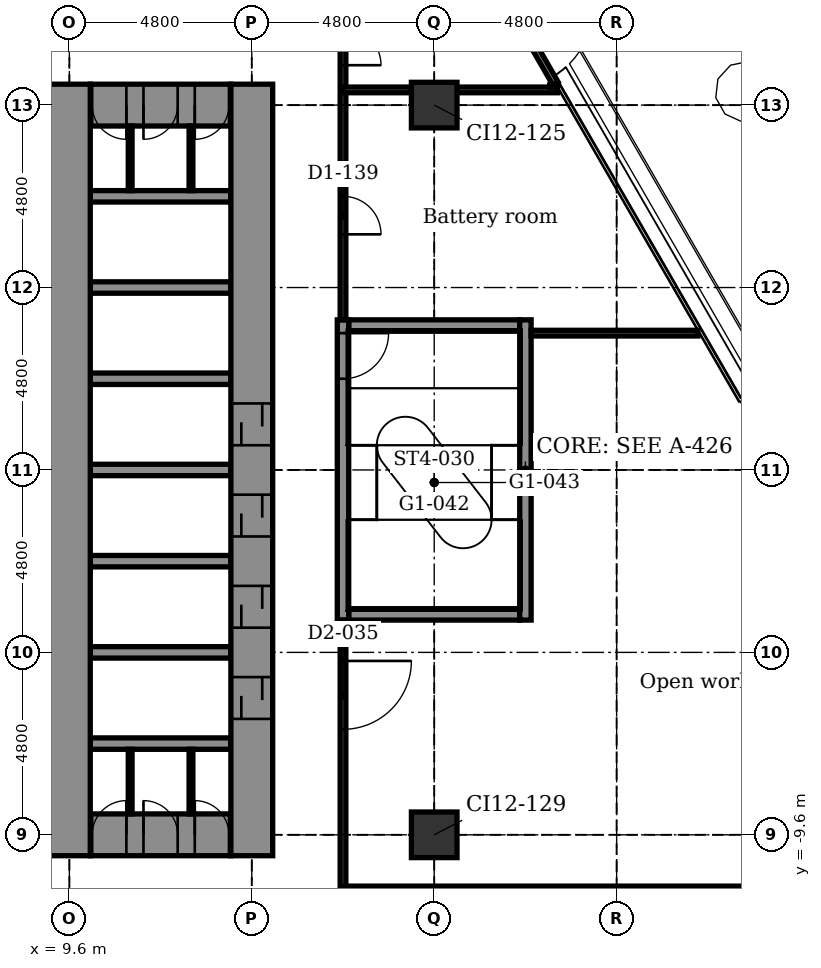
"""IFC4 building model, lengths in metres.
Left out: names, types, materials, properties, quantities, classifications, styles, units other than length and angle.
Written with IfcOpenShell. Run it as: python <this file> out.ifc"""

import sys

from ifc_helpers import new_model, si_unit, direction, frame, frame_2d, origin, origin_2d, place, context, subcontext, project, spatial, rectangle, extrude, element, fill, save


model = new_model("IFC4")
c1 = context("Model", 3, precision=1e-05, world=origin(), true_north=direction((0.0, 1.0)))
c2 = subcontext(c1, "Body", "Model", "MODEL_VIEW")
j1 = project(units=[si_unit("LENGTHUNIT", "METRE"), si_unit("PLANEANGLEUNIT", "RADIAN")], contexts=[c1])
p1 = place(None, origin())
s1 = spatial("IfcSite", under=j1, at=p1, CompositionType="ELEMENT")
p2 = place(p1, origin())
s2 = spatial("IfcBuilding", under=s1, at=p2, CompositionType="ELEMENT")
p3 = place(p2, frame((0.0, 0.0, 60.9)))
s3 = spatial("IfcBuildingStorey", under=s2, at=p3, CompositionType="ELEMENT", Elevation=60.9)
for number, where, z_axis, x_axis in (
    (1, (19.2, -9.6, -0.25), (0.0, 0.0, 1.0), (1.0, 0.0, 0.0)),
    (2, (19.2, 9.6, -0.25), (0.0, 0.0, 1.0), (1.0, 0.0, 0.0)),
):
    element("IfcColumn", number, at=place(p3, frame(where, z_axis=z_axis, x_axis=x_axis)), inside=s3, PredefinedType="COLUMN", context=c2, shape_type="SweptSolid", body=[
        extrude(rectangle(XDim=1.2, YDim=1.2, at=origin_2d()), origin(), (0.0, 0.0, 1.0), 5.45),
    ])
p4 = place(p3, frame((10.15, -9.6, -0.25), z_axis=(0.0, 0.0, 1.0), x_axis=(1.0, 0.0, 0.0)))
e3 = element("IfcWall", 3, at=p4, inside=s3, PredefinedType="SHEAR", context=c2, shape_type="SweptSolid", body=[
    extrude(rectangle(XDim=3.7, YDim=1.1, at=frame_2d((1.85, 0.0))), origin(), (0.0, 0.0, 1.0), 5.45),
])
p5 = place(p4, frame((0.05, 0.0, 0.25)))
e4 = element("IfcOpeningElement", 4, at=p5, cuts=e3, PredefinedType="OPENING", context=c2, shape_type="SweptSolid", body=[
    extrude(rectangle(XDim=0.9, YDim=2.1, at=frame_2d((0.45, 1.05))), frame((0.0, 0.56, 0.0), z_axis=(0.0, -1.0, 0.0), x_axis=(1.0, 0.0, 0.0)), (0.0, 0.0, 1.0), 1.12),
])
p6 = place(p4, frame((1.4, 0.0, 0.25)))
e5 = element("IfcOpeningElement", 5, at=p6, cuts=e3, PredefinedType="OPENING", context=c2, shape_type="SweptSolid", body=[
    extrude(rectangle(XDim=0.9, YDim=2.1, at=frame_2d((0.45, 1.05))), frame((0.0, 0.56, 0.0), z_axis=(0.0, -1.0, 0.0), x_axis=(1.0, 0.0, 0.0)), (0.0, 0.0, 1.0), 1.12),
])
p7 = place(p4, frame((2.75, 0.0, 0.25)))
e6 = element("IfcOpeningElement", 6, at=p7, cuts=e3, PredefinedType="OPENING", context=c2, shape_type="SweptSolid", body=[
    extrude(rectangle(XDim=0.9, YDim=2.1, at=frame_2d((0.45, 1.05))), frame((0.0, 0.56, 0.0), z_axis=(0.0, -1.0, 0.0), x_axis=(1.0, 0.0, 0.0)), (0.0, 0.0, 1.0), 1.12),
])
for number, where, z_axis, x_axis in (
    (7, (10.15, -7.2, -0.25), (0.0, 0.0, 1.0), (1.0, 0.0, 0.0)),
    (8, (10.15, -4.8, -0.25), (0.0, 0.0, 1.0), (1.0, 0.0, 0.0)),
):
    element("IfcWall", number, at=place(p3, frame(where, z_axis=z_axis, x_axis=x_axis)), inside=s3, PredefinedType="STANDARD", context=c2, shape_type="SweptSolid", body=[
        extrude(rectangle(XDim=3.7, YDim=0.3, at=frame_2d((1.85, 0.0))), origin(), (0.0, 0.0, 1.0), 5.45),
    ])
p8 = place(p3, frame((16.95, -3.8, -0.25), z_axis=(0.0, 0.0, 1.0), x_axis=(1.0, 0.0, 0.0)))
e9 = element("IfcWall", 9, at=p8, inside=s3, PredefinedType="STANDARD", context=c2, shape_type="SweptSolid", body=[
    extrude(rectangle(XDim=4.5, YDim=0.3, at=frame_2d((2.25, 0.0))), origin(), (0.0, 0.0, 1.0), 5.45),
])
for number, where, z_axis, x_axis in (
    (10, (10.15, -2.4, -0.25), (0.0, 0.0, 1.0), (1.0, 0.0, 0.0)),
    (11, (10.15, 0.0, -0.25), (0.0, 0.0, 1.0), (1.0, 0.0, 0.0)),
    (12, (10.15, 2.4, -0.25), (0.0, 0.0, 1.0), (1.0, 0.0, 0.0)),
):
    element("IfcWall", number, at=place(p3, frame(where, z_axis=z_axis, x_axis=x_axis)), inside=s3, PredefinedType="STANDARD", context=c2, shape_type="SweptSolid", body=[
        extrude(rectangle(XDim=3.7, YDim=0.3, at=frame_2d((1.85, 0.0))), origin(), (0.0, 0.0, 1.0), 5.45),
    ])
p9 = place(p3, frame((16.95, 3.8, -0.25), z_axis=(0.0, 0.0, 1.0), x_axis=(1.0, 0.0, 0.0)))
e13 = element("IfcWall", 13, at=p9, inside=s3, PredefinedType="STANDARD", context=c2, shape_type="SweptSolid", body=[
    extrude(rectangle(XDim=4.5, YDim=0.3, at=frame_2d((2.25, 0.0))), origin(), (0.0, 0.0, 1.0), 5.45),
])
for number, where, z_axis, x_axis in (
    (14, (10.15, 4.8, -0.25), (0.0, 0.0, 1.0), (1.0, 0.0, 0.0)),
    (15, (10.15, 7.2, -0.25), (0.0, 0.0, 1.0), (1.0, 0.0, 0.0)),
):
    element("IfcWall", number, at=place(p3, frame(where, z_axis=z_axis, x_axis=x_axis)), inside=s3, PredefinedType="STANDARD", context=c2, shape_type="SweptSolid", body=[
        extrude(rectangle(XDim=3.7, YDim=0.3, at=frame_2d((1.85, 0.0))), origin(), (0.0, 0.0, 1.0), 5.45),
    ])
p10 = place(p3, frame((10.15, 9.6, -0.25), z_axis=(0.0, 0.0, 1.0), x_axis=(1.0, 0.0, 0.0)))
e16 = element("IfcWall", 16, at=p10, inside=s3, PredefinedType="SHEAR", context=c2, shape_type="SweptSolid", body=[
    extrude(rectangle(XDim=3.7, YDim=1.1, at=frame_2d((1.85, 0.0))), origin(), (0.0, 0.0, 1.0), 5.45),
])
p11 = place(p10, frame((0.05, 0.0, 0.25)))
e17 = element("IfcOpeningElement", 17, at=p11, cuts=e16, PredefinedType="OPENING", context=c2, shape_type="SweptSolid", body=[
    extrude(rectangle(XDim=0.9, YDim=2.1, at=frame_2d((0.45, 1.05))), frame((0.0, 0.56, 0.0), z_axis=(0.0, -1.0, 0.0), x_axis=(1.0, 0.0, 0.0)), (0.0, 0.0, 1.0), 1.12),
])
p12 = place(p10, frame((1.4, 0.0, 0.25)))
e18 = element("IfcOpeningElement", 18, at=p12, cuts=e16, PredefinedType="OPENING", context=c2, shape_type="SweptSolid", body=[
    extrude(rectangle(XDim=0.9, YDim=2.1, at=frame_2d((0.45, 1.05))), frame((0.0, 0.56, 0.0), z_axis=(0.0, -1.0, 0.0), x_axis=(1.0, 0.0, 0.0)), (0.0, 0.0, 1.0), 1.12),
])
p13 = place(p10, frame((2.75, 0.0, 0.25)))
e19 = element("IfcOpeningElement", 19, at=p13, cuts=e16, PredefinedType="OPENING", context=c2, shape_type="SweptSolid", body=[
    extrude(rectangle(XDim=0.9, YDim=2.1, at=frame_2d((0.45, 1.05))), frame((0.0, 0.56, 0.0), z_axis=(0.0, -1.0, 0.0), x_axis=(1.0, 0.0, 0.0)), (0.0, 0.0, 1.0), 1.12),
])
p14 = place(p3, frame((9.6, -10.15, -0.25), z_axis=(0.0, 0.0, 1.0), x_axis=(0.0, 1.0, 0.0)))
e20 = element("IfcWall", 20, at=p14, inside=s3, PredefinedType="SHEAR", context=c2, shape_type="SweptSolid", body=[
    extrude(rectangle(XDim=20.3, YDim=1.1, at=frame_2d((10.15, 0.0))), origin(), (0.0, 0.0, 1.0), 5.45),
])
p15 = place(p3, frame((14.4, -10.15, -0.25), z_axis=(0.0, 0.0, 1.0), x_axis=(0.0, 1.0, 0.0)))
e21 = element("IfcWall", 21, at=p15, inside=s3, PredefinedType="SHEAR", context=c2, shape_type="SweptSolid", body=[
    extrude(rectangle(XDim=20.3, YDim=1.1, at=frame_2d((10.15, 0.0))), origin(), (0.0, 0.0, 1.0), 5.45),
])
p16 = place(p15, frame((3.6, 0.0, 0.25)))
e22 = element("IfcOpeningElement", 22, at=p16, cuts=e21, PredefinedType="OPENING", context=c2, shape_type="SweptSolid", body=[
    extrude(rectangle(XDim=1.1, YDim=2.1, at=frame_2d((0.55, 1.05))), frame((0.0, 0.56, 0.0), z_axis=(0.0, -1.0, 0.0), x_axis=(1.0, 0.0, 0.0)), (0.0, 0.0, 1.0), 1.12),
])
p17 = place(p15, frame((6.0, 0.0, 0.25)))
e23 = element("IfcOpeningElement", 23, at=p17, cuts=e21, PredefinedType="OPENING", context=c2, shape_type="SweptSolid", body=[
    extrude(rectangle(XDim=1.1, YDim=2.1, at=frame_2d((0.55, 1.05))), frame((0.0, 0.56, 0.0), z_axis=(0.0, -1.0, 0.0), x_axis=(1.0, 0.0, 0.0)), (0.0, 0.0, 1.0), 1.12),
])
p18 = place(p15, frame((8.4, 0.0, 0.25)))
e24 = element("IfcOpeningElement", 24, at=p18, cuts=e21, PredefinedType="OPENING", context=c2, shape_type="SweptSolid", body=[
    extrude(rectangle(XDim=1.1, YDim=2.1, at=frame_2d((0.55, 1.05))), frame((0.0, 0.56, 0.0), z_axis=(0.0, -1.0, 0.0), x_axis=(1.0, 0.0, 0.0)), (0.0, 0.0, 1.0), 1.12),
])
p19 = place(p15, frame((10.8, 0.0, 0.25)))
e25 = element("IfcOpeningElement", 25, at=p19, cuts=e21, PredefinedType="OPENING", context=c2, shape_type="SweptSolid", body=[
    extrude(rectangle(XDim=1.1, YDim=2.1, at=frame_2d((0.55, 1.05))), frame((0.0, 0.56, 0.0), z_axis=(0.0, -1.0, 0.0), x_axis=(1.0, 0.0, 0.0)), (0.0, 0.0, 1.0), 1.12),
])
p20 = place(p3, frame((16.8, -3.95, -0.25), z_axis=(0.0, 0.0, 1.0), x_axis=(0.0, 1.0, 0.0)))
e26 = element("IfcWall", 26, at=p20, inside=s3, PredefinedType="STANDARD", context=c2, shape_type="SweptSolid", body=[
    extrude(rectangle(XDim=7.9, YDim=0.3, at=frame_2d((3.95, 0.0))), origin(), (0.0, 0.0, 1.0), 5.45),
])
p21 = place(p20, frame((6.35, 0.0, 0.25)))
e27 = element("IfcOpeningElement", 27, at=p21, cuts=e26, PredefinedType="OPENING", context=c2, shape_type="SweptSolid", body=[
    extrude(rectangle(XDim=1.2, YDim=2.1, at=frame_2d((0.6, 1.05))), frame((0.0, 0.16, 0.0), z_axis=(0.0, -1.0, 0.0), x_axis=(1.0, 0.0, 0.0)), (0.0, 0.0, 1.0), 0.32),
])
p22 = place(p3, frame((21.6, -3.95, -0.25), z_axis=(0.0, 0.0, 1.0), x_axis=(0.0, 1.0, 0.0)))
e28 = element("IfcWall", 28, at=p22, inside=s3, PredefinedType="STANDARD", context=c2, shape_type="SweptSolid", body=[
    extrude(rectangle(XDim=7.9, YDim=0.3, at=frame_2d((3.95, 0.0))), origin(), (0.0, 0.0, 1.0), 5.45),
])
p23 = place(p3, frame((20.003, 14.304, 0.0), z_axis=(0.0, 0.0, 1.0), x_axis=(0.500007367075, -0.86602115036, 0.0)))
e29 = element("IfcWall", 29, at=p23, inside=s3, PredefinedType="PARTITIONING", context=c2, shape_type="SweptSolid", body=[
    extrude(rectangle(XDim=4.772, YDim=0.16, at=frame_2d((2.386, 0.0))), origin(), (0.0, 0.0, 1.0), 5.2),
])
p24 = place(p23, frame((1.186, 0.0, 0.0)))
e30 = element("IfcOpeningElement", 30, at=p24, cuts=e29, PredefinedType="OPENING", context=c2, shape_type="SweptSolid", body=[
    extrude(rectangle(XDim=2.4, YDim=2.4, at=frame_2d((1.2, 1.2))), frame((0.0, 0.09, 0.0), z_axis=(0.0, -1.0, 0.0), x_axis=(1.0, 0.0, 0.0)), (0.0, 0.0, 1.0), 0.18),
])
p25 = place(p3, frame((16.8, -12.4, 0.0), z_axis=(0.0, 0.0, 1.0), x_axis=(0.0, 1.0, 0.0)))
e31 = element("IfcWall", 31, at=p25, inside=s3, PredefinedType="PARTITIONING", context=c2, shape_type="SweptSolid", body=[
    extrude(rectangle(XDim=8.45, YDim=0.15, at=frame_2d((4.225, 0.0))), origin(), (0.0, 0.0, 1.0), 5.2),
])
p26 = place(p25, frame((5.575, 0.0, 0.0)))
e32 = element("IfcOpeningElement", 32, at=p26, cuts=e31, PredefinedType="OPENING", context=c2, shape_type="SweptSolid", body=[
    extrude(rectangle(XDim=1.8, YDim=2.1, at=frame_2d((0.9, 1.05))), frame((0.0, 0.085, 0.0), z_axis=(0.0, -1.0, 0.0), x_axis=(1.0, 0.0, 0.0)), (0.0, 0.0, 1.0), 0.17),
])
p27 = place(p3, frame((16.8, 3.95, 0.0), z_axis=(0.0, 0.0, 1.0), x_axis=(0.0, 1.0, 0.0)))
e33 = element("IfcWall", 33, at=p27, inside=s3, PredefinedType="PARTITIONING", context=c2, shape_type="SweptSolid", body=[
    extrude(rectangle(XDim=8.75, YDim=0.15, at=frame_2d((4.375, 0.0))), origin(), (0.0, 0.0, 1.0), 5.2),
])
p28 = place(p27, frame((2.25, 0.0, 0.0)))
e34 = element("IfcOpeningElement", 34, at=p28, cuts=e33, PredefinedType="OPENING", context=c2, shape_type="SweptSolid", body=[
    extrude(rectangle(XDim=1.0, YDim=2.1, at=frame_2d((0.5, 1.05))), frame((0.0, 0.085, 0.0), z_axis=(0.0, -1.0, 0.0), x_axis=(1.0, 0.0, 0.0)), (0.0, 0.0, 1.0), 0.17),
])
p29 = place(p27, frame((6.7, 0.0, 0.0)))
e35 = element("IfcOpeningElement", 35, at=p29, cuts=e33, PredefinedType="OPENING", context=c2, shape_type="SweptSolid", body=[
    extrude(rectangle(XDim=1.0, YDim=2.1, at=frame_2d((0.5, 1.05))), frame((0.0, 0.085, 0.0), z_axis=(0.0, -1.0, 0.0), x_axis=(1.0, 0.0, 0.0)), (0.0, 0.0, 1.0), 0.17),
])
for number, where, z_axis, x_axis in (
    (36, (12.8, -9.05, 0.0), (0.0, 0.0, 1.0), (0.0, 1.0, 0.0)),
    (37, (12.8, 7.35, 0.0), (0.0, 0.0, 1.0), (0.0, 1.0, 0.0)),
    (38, (11.2, -9.05, 0.0), (0.0, 0.0, 1.0), (0.0, 1.0, 0.0)),
    (39, (11.2, 7.35, 0.0), (0.0, 0.0, 1.0), (0.0, 1.0, 0.0)),
):
    element("IfcWall", number, at=place(p3, frame(where, z_axis=z_axis, x_axis=x_axis)), inside=s3, PredefinedType="PARTITIONING", context=c2, shape_type="SweptSolid", body=[
        extrude(rectangle(XDim=1.7, YDim=0.1, at=frame_2d((0.85, 0.0))), origin(), (0.0, 0.0, 1.0), 5.2),
    ])
p30 = place(p3, frame((16.8, -11.0, 0.0), z_axis=(0.0, 0.0, 1.0), x_axis=(1.0, 0.0, 0.0)))
e40 = element("IfcWall", 40, at=p30, inside=s3, PredefinedType="PARTITIONING", context=c2, shape_type="SweptSolid", body=[
    extrude(rectangle(XDim=13.378, YDim=0.1, at=frame_2d((6.689, 0.0))), origin(), (0.0, 0.0, 1.0), 5.2),
])
p31 = place(p3, frame((21.75, 3.6, 0.0), z_axis=(0.0, 0.0, 1.0), x_axis=(1.0, 0.0, 0.0)))
e41 = element("IfcWall", 41, at=p31, inside=s3, PredefinedType="PARTITIONING", context=c2, shape_type="SweptSolid", body=[
    extrude(rectangle(XDim=4.387, YDim=0.15, at=frame_2d((2.194, 0.0))), origin(), (0.0, 0.0, 1.0), 5.2),
])
p32 = place(p3, frame((16.8, 10.0, 0.0), z_axis=(0.0, 0.0, 1.0), x_axis=(1.0, 0.0, 0.0)))
e42 = element("IfcWall", 42, at=p32, inside=s3, PredefinedType="PARTITIONING", context=c2, shape_type="SweptSolid", body=[
    extrude(rectangle(XDim=1.8, YDim=0.15, at=frame_2d((0.9, 0.0))), origin(), (0.0, 0.0, 1.0), 5.2),
])
p33 = place(p3, frame((19.8, 10.0, 0.0), z_axis=(0.0, 0.0, 1.0), x_axis=(1.0, 0.0, 0.0)))
e43 = element("IfcWall", 43, at=p33, inside=s3, PredefinedType="PARTITIONING", context=c2, shape_type="SweptSolid", body=[
    extrude(rectangle(XDim=2.642, YDim=0.15, at=frame_2d((1.321, 0.0))), origin(), (0.0, 0.0, 1.0), 5.2),
])
p34 = place(p3, frame((22.32, 10.132, 0.0), z_axis=(0.0, 0.0, 1.0), x_axis=(0.0, -1.0, 0.0)))
e44 = element("IfcWall", 44, at=p34, inside=s3, PredefinedType="PARTITIONING", context=c2, shape_type="SweptSolid", body=[
    extrude(rectangle(XDim=0.058, YDim=0.16, at=frame_2d((0.029, 0.0))), origin(), (0.0, 0.0, 1.0), 5.2),
])
p35 = place(p26, frame((1.8, 0.0, 0.0), z_axis=(0.0, 0.0, 1.0), x_axis=(-1.0, 0.0, 0.0)))
e45 = element("IfcDoor", 45, at=p35, inside=s3, OperationType="SINGLE_SWING_RIGHT", PredefinedType="DOOR", context=c2, shape_type="SweptSolid", body=[
    extrude(rectangle(XDim=1.8, YDim=2.1, at=frame_2d((0.9, 1.05))), frame((0.0, 0.025, 0.0), z_axis=(0.0, -1.0, 0.0), x_axis=(1.0, 0.0, 0.0)), (0.0, 0.0, 1.0), 0.05),
])
fill(e32, e45)
p36 = place(p28, frame((1.0, 0.0, 0.0), z_axis=(0.0, 0.0, 1.0), x_axis=(-1.0, 0.0, 0.0)))
e46 = element("IfcDoor", 46, at=p36, inside=s3, OperationType="SINGLE_SWING_LEFT", PredefinedType="DOOR", context=c2, shape_type="SweptSolid", body=[
    extrude(rectangle(XDim=1.0, YDim=2.1, at=frame_2d((0.5, 1.05))), frame((0.0, 0.025, 0.0), z_axis=(0.0, -1.0, 0.0), x_axis=(1.0, 0.0, 0.0)), (0.0, 0.0, 1.0), 0.05),
])
fill(e34, e46)
p37 = place(p29, frame((1.0, 0.0, 0.0), z_axis=(0.0, 0.0, 1.0), x_axis=(-1.0, 0.0, 0.0)))
e47 = element("IfcDoor", 47, at=p37, inside=s3, OperationType="SINGLE_SWING_LEFT", PredefinedType="DOOR", context=c2, shape_type="SweptSolid", body=[
    extrude(rectangle(XDim=1.0, YDim=2.1, at=frame_2d((0.5, 1.05))), frame((0.0, 0.025, 0.0), z_axis=(0.0, -1.0, 0.0), x_axis=(1.0, 0.0, 0.0)), (0.0, 0.0, 1.0), 0.05),
])
fill(e35, e47)
p38 = place(p16, origin())
e48 = element("IfcDoor", 48, at=p38, inside=s3, OperationType="DOUBLE_DOOR_SLIDING", PredefinedType="DOOR", context=c2, shape_type="SweptSolid", body=[
    extrude(rectangle(XDim=1.1, YDim=2.1, at=frame_2d((0.55, 1.05))), frame((0.0, 0.025, 0.0), z_axis=(0.0, -1.0, 0.0), x_axis=(1.0, 0.0, 0.0)), (0.0, 0.0, 1.0), 0.05),
])
fill(e22, e48)
p39 = place(p17, origin())
e49 = element("IfcDoor", 49, at=p39, inside=s3, OperationType="DOUBLE_DOOR_SLIDING", PredefinedType="DOOR", context=c2, shape_type="SweptSolid", body=[
    extrude(rectangle(XDim=1.1, YDim=2.1, at=frame_2d((0.55, 1.05))), frame((0.0, 0.025, 0.0), z_axis=(0.0, -1.0, 0.0), x_axis=(1.0, 0.0, 0.0)), (0.0, 0.0, 1.0), 0.05),
])
fill(e23, e49)
p40 = place(p18, origin())
e50 = element("IfcDoor", 50, at=p40, inside=s3, OperationType="DOUBLE_DOOR_SLIDING", PredefinedType="DOOR", context=c2, shape_type="SweptSolid", body=[
    extrude(rectangle(XDim=1.1, YDim=2.1, at=frame_2d((0.55, 1.05))), frame((0.0, 0.025, 0.0), z_axis=(0.0, -1.0, 0.0), x_axis=(1.0, 0.0, 0.0)), (0.0, 0.0, 1.0), 0.05),
])
fill(e24, e50)
p41 = place(p19, origin())
e51 = element("IfcDoor", 51, at=p41, inside=s3, OperationType="DOUBLE_DOOR_SLIDING", PredefinedType="DOOR", context=c2, shape_type="SweptSolid", body=[
    extrude(rectangle(XDim=1.1, YDim=2.1, at=frame_2d((0.55, 1.05))), frame((0.0, 0.025, 0.0), z_axis=(0.0, -1.0, 0.0), x_axis=(1.0, 0.0, 0.0)), (0.0, 0.0, 1.0), 0.05),
])
fill(e25, e51)
p42 = place(p21, frame((1.2, 0.0, 0.0), z_axis=(0.0, 0.0, 1.0), x_axis=(-1.0, 0.0, 0.0)))
e52 = element("IfcDoor", 52, at=p42, inside=s3, OperationType="SINGLE_SWING_RIGHT", PredefinedType="DOOR", context=c2, shape_type="SweptSolid", body=[
    extrude(rectangle(XDim=1.2, YDim=2.1, at=frame_2d((0.6, 1.05))), frame((0.0, 0.025, 0.0), z_axis=(0.0, -1.0, 0.0), x_axis=(1.0, 0.0, 0.0)), (0.0, 0.0, 1.0), 0.05),
])
fill(e27, e52)
p43 = place(p5, origin())
e53 = element("IfcDoor", 53, at=p43, inside=s3, OperationType="SINGLE_SWING_RIGHT", PredefinedType="DOOR", context=c2, shape_type="SweptSolid", body=[
    extrude(rectangle(XDim=0.9, YDim=2.1, at=frame_2d((0.45, 1.05))), frame((0.0, 0.025, 0.0), z_axis=(0.0, -1.0, 0.0), x_axis=(1.0, 0.0, 0.0)), (0.0, 0.0, 1.0), 0.05),
])
fill(e4, e53)
p44 = place(p6, origin())
e54 = element("IfcDoor", 54, at=p44, inside=s3, OperationType="SINGLE_SWING_LEFT", PredefinedType="DOOR", context=c2, shape_type="SweptSolid", body=[
    extrude(rectangle(XDim=0.9, YDim=2.1, at=frame_2d((0.45, 1.05))), frame((0.0, 0.025, 0.0), z_axis=(0.0, -1.0, 0.0), x_axis=(1.0, 0.0, 0.0)), (0.0, 0.0, 1.0), 0.05),
])
fill(e5, e54)
p45 = place(p7, origin())
e55 = element("IfcDoor", 55, at=p45, inside=s3, OperationType="SINGLE_SWING_LEFT", PredefinedType="DOOR", context=c2, shape_type="SweptSolid", body=[
    extrude(rectangle(XDim=0.9, YDim=2.1, at=frame_2d((0.45, 1.05))), frame((0.0, 0.025, 0.0), z_axis=(0.0, -1.0, 0.0), x_axis=(1.0, 0.0, 0.0)), (0.0, 0.0, 1.0), 0.05),
])
fill(e6, e55)
p46 = place(p11, frame((0.9, 0.0, 0.0), z_axis=(0.0, 0.0, 1.0), x_axis=(-1.0, 0.0, 0.0)))
e56 = element("IfcDoor", 56, at=p46, inside=s3, OperationType="SINGLE_SWING_RIGHT", PredefinedType="DOOR", context=c2, shape_type="SweptSolid", body=[
    extrude(rectangle(XDim=0.9, YDim=2.1, at=frame_2d((0.45, 1.05))), frame((0.0, 0.025, 0.0), z_axis=(0.0, -1.0, 0.0), x_axis=(1.0, 0.0, 0.0)), (0.0, 0.0, 1.0), 0.05),
])
fill(e17, e56)
p47 = place(p12, frame((0.9, 0.0, 0.0), z_axis=(0.0, 0.0, 1.0), x_axis=(-1.0, 0.0, 0.0)))
e57 = element("IfcDoor", 57, at=p47, inside=s3, OperationType="SINGLE_SWING_LEFT", PredefinedType="DOOR", context=c2, shape_type="SweptSolid", body=[
    extrude(rectangle(XDim=0.9, YDim=2.1, at=frame_2d((0.45, 1.05))), frame((0.0, 0.025, 0.0), z_axis=(0.0, -1.0, 0.0), x_axis=(1.0, 0.0, 0.0)), (0.0, 0.0, 1.0), 0.05),
])
fill(e18, e57)
p48 = place(p13, frame((0.9, 0.0, 0.0), z_axis=(0.0, 0.0, 1.0), x_axis=(-1.0, 0.0, 0.0)))
e58 = element("IfcDoor", 58, at=p48, inside=s3, OperationType="SINGLE_SWING_LEFT", PredefinedType="DOOR", context=c2, shape_type="SweptSolid", body=[
    extrude(rectangle(XDim=0.9, YDim=2.1, at=frame_2d((0.45, 1.05))), frame((0.0, 0.025, 0.0), z_axis=(0.0, -1.0, 0.0), x_axis=(1.0, 0.0, 0.0)), (0.0, 0.0, 1.0), 0.05),
])
fill(e19, e58)
save(model, sys.argv[1])
